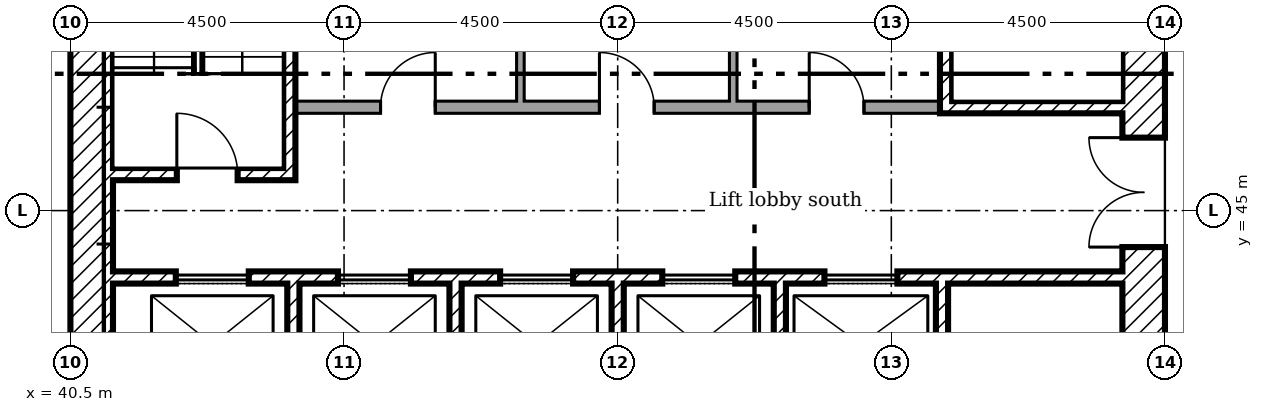
"""IFC4 building model, lengths in metres.
Left out: names, types, materials, properties, quantities, classifications, styles, units other than length and angle.
Written with IfcOpenShell. Run it as: python <this file> out.ifc"""

import sys

from ifc_helpers import new_model, si_unit, direction, frame, frame_2d, origin, place, context, subcontext, project, spatial, rectangle, extrude, element, fill, save


model = new_model("IFC4")
c1 = context("Model", 3, precision=1e-05, world=origin(), true_north=direction((0.0, 1.0)))
c2 = subcontext(c1, "Body", "Model", "MODEL_VIEW")
j1 = project(units=[si_unit("LENGTHUNIT", "METRE"), si_unit("PLANEANGLEUNIT", "RADIAN")], contexts=[c1])
p1 = place(None, origin())
s1 = spatial("IfcSite", under=j1, at=p1, CompositionType="ELEMENT")
p2 = place(p1, origin())
s2 = spatial("IfcBuilding", under=s1, at=p2, CompositionType="ELEMENT")
p3 = place(p2, frame((0.0, 0.0, 138.8)))
s3 = spatial("IfcBuildingStorey", under=s2, at=p3, CompositionType="ELEMENT", Elevation=138.8)
p4 = place(p3, frame((58.15, 40.5, 0.0), z_axis=(0.0, 0.0, 1.0), x_axis=(0.0, 1.0, 0.0)))
e1 = element("IfcWall", 1, at=p4, inside=s3, PredefinedType="SHEAR", context=c2, shape_type="SweptSolid", body=[
    extrude(rectangle(XDim=18.0, YDim=0.7, at=frame_2d((9.0, 0.0))), origin(), (0.0, 0.0, 1.0), 4.75),
])
p5 = place(p4, frame((13.15, 0.0, 0.0)))
e2 = element("IfcOpeningElement", 2, at=p5, cuts=e1, PredefinedType="OPENING", context=c2, shape_type="SweptSolid", body=[
    extrude(rectangle(XDim=1.2, YDim=2.1, at=frame_2d((0.6, 1.05))), frame((0.0, 0.36, 0.0), z_axis=(0.0, -1.0, 0.0), x_axis=(1.0, 0.0, 0.0)), (0.0, 0.0, 1.0), 0.72),
])
p6 = place(p4, frame((3.9, 0.0, 0.0)))
e3 = element("IfcOpeningElement", 3, at=p6, cuts=e1, PredefinedType="OPENING", context=c2, shape_type="SweptSolid", body=[
    extrude(rectangle(XDim=1.8, YDim=2.1, at=frame_2d((0.9, 1.05))), frame((0.0, 0.36, 0.0), z_axis=(0.0, -1.0, 0.0), x_axis=(1.0, 0.0, 0.0)), (0.0, 0.0, 1.0), 0.72),
])
p7 = place(p4, frame((11.525, 0.0, 0.0)))
e4 = element("IfcOpeningElement", 4, at=p7, cuts=e1, PredefinedType="OPENING", context=c2, shape_type="SweptSolid", body=[
    extrude(rectangle(XDim=1.0, YDim=2.1, at=frame_2d((0.5, 1.05))), frame((0.0, 0.36, 0.0), z_axis=(0.0, -1.0, 0.0), x_axis=(1.0, 0.0, 0.0)), (0.0, 0.0, 1.0), 0.72),
])
p8 = place(p3, frame((40.85, 40.5, 0.0), z_axis=(0.0, 0.0, 1.0), x_axis=(0.0, 1.0, 0.0)))
e5 = element("IfcWall", 5, at=p8, inside=s3, PredefinedType="SHEAR", context=c2, shape_type="SweptSolid", body=[
    extrude(rectangle(XDim=18.0, YDim=0.7, at=frame_2d((9.0, 0.0))), origin(), (0.0, 0.0, 1.0), 4.75),
])
for number, where, z_axis, x_axis in (
    (6, (44.167, 41.2, 0.0), (0.0, 0.0, 1.0), (0.0, 1.0, 0.0)),
    (7, (46.833, 41.2, 0.0), (0.0, 0.0, 1.0), (0.0, 1.0, 0.0)),
    (8, (49.5, 41.2, 0.0), (0.0, 0.0, 1.0), (0.0, 1.0, 0.0)),
    (9, (52.167, 41.2, 0.0), (0.0, 0.0, 1.0), (0.0, 1.0, 0.0)),
    (10, (54.833, 41.2, 0.0), (0.0, 0.0, 1.0), (0.0, 1.0, 0.0)),
):
    element("IfcWall", number, at=place(p3, frame(where, z_axis=z_axis, x_axis=x_axis)), inside=s3, PredefinedType="SHEAR", context=c2, shape_type="SweptSolid", body=[
        extrude(rectangle(XDim=2.6, YDim=0.2, at=frame_2d((1.3, 0.0))), origin(), (0.0, 0.0, 1.0), 4.75),
    ])
p9 = place(p3, frame((41.2, 43.9, 0.0)))
e11 = element("IfcWall", 11, at=p9, inside=s3, PredefinedType="SHEAR", context=c2, shape_type="SweptSolid", body=[
    extrude(rectangle(XDim=16.6, YDim=0.2, at=frame_2d((8.3, 0.0))), origin(), (0.0, 0.0, 1.0), 4.75),
])
p10 = place(p9, frame((1.033, 0.0, 0.0)))
e12 = element("IfcOpeningElement", 12, at=p10, cuts=e11, PredefinedType="OPENING", context=c2, shape_type="SweptSolid", body=[
    extrude(rectangle(XDim=1.2, YDim=2.1, at=frame_2d((0.6, 1.05))), frame((0.0, 0.11, 0.0), z_axis=(0.0, -1.0, 0.0), x_axis=(1.0, 0.0, 0.0)), (0.0, 0.0, 1.0), 0.22),
])
p11 = place(p9, frame((3.7, 0.0, 0.0)))
e13 = element("IfcOpeningElement", 13, at=p11, cuts=e11, PredefinedType="OPENING", context=c2, shape_type="SweptSolid", body=[
    extrude(rectangle(XDim=1.2, YDim=2.1, at=frame_2d((0.6, 1.05))), frame((0.0, 0.11, 0.0), z_axis=(0.0, -1.0, 0.0), x_axis=(1.0, 0.0, 0.0)), (0.0, 0.0, 1.0), 0.22),
])
p12 = place(p9, frame((6.367, 0.0, 0.0)))
e14 = element("IfcOpeningElement", 14, at=p12, cuts=e11, PredefinedType="OPENING", context=c2, shape_type="SweptSolid", body=[
    extrude(rectangle(XDim=1.2, YDim=2.1, at=frame_2d((0.6, 1.05))), frame((0.0, 0.11, 0.0), z_axis=(0.0, -1.0, 0.0), x_axis=(1.0, 0.0, 0.0)), (0.0, 0.0, 1.0), 0.22),
])
p13 = place(p9, frame((9.033, 0.0, 0.0)))
e15 = element("IfcOpeningElement", 15, at=p13, cuts=e11, PredefinedType="OPENING", context=c2, shape_type="SweptSolid", body=[
    extrude(rectangle(XDim=1.2, YDim=2.1, at=frame_2d((0.6, 1.05))), frame((0.0, 0.11, 0.0), z_axis=(0.0, -1.0, 0.0), x_axis=(1.0, 0.0, 0.0)), (0.0, 0.0, 1.0), 0.22),
])
p14 = place(p9, frame((11.7, 0.0, 0.0)))
e16 = element("IfcOpeningElement", 16, at=p14, cuts=e11, PredefinedType="OPENING", context=c2, shape_type="SweptSolid", body=[
    extrude(rectangle(XDim=1.2, YDim=2.1, at=frame_2d((0.6, 1.05))), frame((0.0, 0.11, 0.0), z_axis=(0.0, -1.0, 0.0), x_axis=(1.0, 0.0, 0.0)), (0.0, 0.0, 1.0), 0.22),
])
p15 = place(p3, frame((44.1, 45.5, 0.0), z_axis=(0.0, 0.0, 1.0), x_axis=(0.0, 1.0, 0.0)))
e17 = element("IfcWall", 17, at=p15, inside=s3, PredefinedType="SHEAR", context=c2, shape_type="SweptSolid", body=[
    extrude(rectangle(XDim=6.9, YDim=0.2, at=frame_2d((3.45, 0.0))), origin(), (0.0, 0.0, 1.0), 4.75),
])
p16 = place(p3, frame((41.2, 45.6, 0.0)))
e18 = element("IfcWall", 18, at=p16, inside=s3, PredefinedType="SHEAR", context=c2, shape_type="SweptSolid", body=[
    extrude(rectangle(XDim=2.8, YDim=0.2, at=frame_2d((1.4, 0.0))), origin(), (0.0, 0.0, 1.0), 4.75),
])
p17 = place(p16, frame((1.05, 0.0, 0.0)))
e19 = element("IfcOpeningElement", 19, at=p17, cuts=e18, PredefinedType="OPENING", context=c2, shape_type="SweptSolid", body=[
    extrude(rectangle(XDim=1.0, YDim=2.1, at=frame_2d((0.5, 1.05))), frame((0.0, 0.11, 0.0), z_axis=(0.0, -1.0, 0.0), x_axis=(1.0, 0.0, 0.0)), (0.0, 0.0, 1.0), 0.22),
])
p18 = place(p3, frame((54.8, 46.7, 0.0)))
e20 = element("IfcWall", 20, at=p18, inside=s3, PredefinedType="SHEAR", context=c2, shape_type="SweptSolid", body=[
    extrude(rectangle(XDim=3.0, YDim=0.2, at=frame_2d((1.5, 0.0))), origin(), (0.0, 0.0, 1.0), 4.75),
])
p19 = place(p3, frame((54.9, 46.8, 0.0), z_axis=(0.0, 0.0, 1.0), x_axis=(0.0, 1.0, 0.0)))
e21 = element("IfcWall", 21, at=p19, inside=s3, PredefinedType="SHEAR", context=c2, shape_type="SweptSolid", body=[
    extrude(rectangle(XDim=6.5, YDim=0.2, at=frame_2d((3.25, 0.0))), origin(), (0.0, 0.0, 1.0), 4.75),
])
p20 = place(p3, frame((44.2, 46.7, 0.0)))
e22 = element("IfcWall", 22, at=p20, inside=s3, PredefinedType="PARTITIONING", context=c2, shape_type="SweptSolid", body=[
    extrude(rectangle(XDim=10.6, YDim=0.2, at=frame_2d((5.3, 0.0))), origin(), (0.0, 0.0, 1.0), 4.75),
])
p21 = place(p20, frame((1.4, 0.0, 0.0)))
e23 = element("IfcOpeningElement", 23, at=p21, cuts=e22, PredefinedType="OPENING", context=c2, shape_type="SweptSolid", body=[
    extrude(rectangle(XDim=0.9, YDim=2.1, at=frame_2d((0.45, 1.05))), frame((0.0, 0.11, 0.0), z_axis=(0.0, -1.0, 0.0), x_axis=(1.0, 0.0, 0.0)), (0.0, 0.0, 1.0), 0.22),
])
p22 = place(p20, frame((5.0, 0.0, 0.0)))
e24 = element("IfcOpeningElement", 24, at=p22, cuts=e22, PredefinedType="OPENING", context=c2, shape_type="SweptSolid", body=[
    extrude(rectangle(XDim=0.9, YDim=2.1, at=frame_2d((0.45, 1.05))), frame((0.0, 0.11, 0.0), z_axis=(0.0, -1.0, 0.0), x_axis=(1.0, 0.0, 0.0)), (0.0, 0.0, 1.0), 0.22),
])
p23 = place(p20, frame((8.45, 0.0, 0.0)))
e25 = element("IfcOpeningElement", 25, at=p23, cuts=e22, PredefinedType="OPENING", context=c2, shape_type="SweptSolid", body=[
    extrude(rectangle(XDim=0.9, YDim=2.1, at=frame_2d((0.45, 1.05))), frame((0.0, 0.11, 0.0), z_axis=(0.0, -1.0, 0.0), x_axis=(1.0, 0.0, 0.0)), (0.0, 0.0, 1.0), 0.22),
])
p24 = place(p3, frame((47.9, 46.8, 0.0), z_axis=(0.0, 0.0, 1.0), x_axis=(0.0, 1.0, 0.0)))
e26 = element("IfcWall", 26, at=p24, inside=s3, PredefinedType="PARTITIONING", context=c2, shape_type="SweptSolid", body=[
    extrude(rectangle(XDim=5.0, YDim=0.125, at=frame_2d((2.5, 0.0))), origin(), (0.0, 0.0, 1.0), 4.75),
])
p25 = place(p3, frame((51.4, 46.8, 0.0), z_axis=(0.0, 0.0, 1.0), x_axis=(0.0, 1.0, 0.0)))
e27 = element("IfcWall", 27, at=p25, inside=s3, PredefinedType="PARTITIONING", context=c2, shape_type="SweptSolid", body=[
    extrude(rectangle(XDim=2.762, YDim=0.125, at=frame_2d((1.381, 0.0))), origin(), (0.0, 0.0, 1.0), 4.75),
])
p26 = place(p6, origin())
e28 = element("IfcDoor", 28, at=p26, inside=s3, OperationType="DOUBLE_DOOR_SINGLE_SWING", PredefinedType="DOOR", context=c2, shape_type="SweptSolid", body=[
    extrude(rectangle(XDim=1.8, YDim=2.1, at=frame_2d((0.9, 1.05))), frame((0.0, 0.025, 0.0), z_axis=(0.0, -1.0, 0.0), x_axis=(1.0, 0.0, 0.0)), (0.0, 0.0, 1.0), 0.05),
])
fill(e3, e28)
p27 = place(p17, origin())
e29 = element("IfcDoor", 29, at=p27, inside=s3, OperationType="SINGLE_SWING_RIGHT", PredefinedType="DOOR", context=c2, shape_type="SweptSolid", body=[
    extrude(rectangle(XDim=1.0, YDim=2.1, at=frame_2d((0.5, 1.05))), frame((0.0, 0.025, 0.0), z_axis=(0.0, -1.0, 0.0), x_axis=(1.0, 0.0, 0.0)), (0.0, 0.0, 1.0), 0.05),
])
fill(e19, e29)
p28 = place(p21, origin())
e30 = element("IfcDoor", 30, at=p28, inside=s3, OperationType="SINGLE_SWING_LEFT", PredefinedType="DOOR", context=c2, shape_type="SweptSolid", body=[
    extrude(rectangle(XDim=0.9, YDim=2.1, at=frame_2d((0.45, 1.05))), frame((0.0, 0.025, 0.0), z_axis=(0.0, -1.0, 0.0), x_axis=(1.0, 0.0, 0.0)), (0.0, 0.0, 1.0), 0.05),
])
fill(e23, e30)
p29 = place(p22, origin())
e31 = element("IfcDoor", 31, at=p29, inside=s3, OperationType="SINGLE_SWING_RIGHT", PredefinedType="DOOR", context=c2, shape_type="SweptSolid", body=[
    extrude(rectangle(XDim=0.9, YDim=2.1, at=frame_2d((0.45, 1.05))), frame((0.0, 0.025, 0.0), z_axis=(0.0, -1.0, 0.0), x_axis=(1.0, 0.0, 0.0)), (0.0, 0.0, 1.0), 0.05),
])
fill(e24, e31)
p30 = place(p23, origin())
e32 = element("IfcDoor", 32, at=p30, inside=s3, OperationType="SINGLE_SWING_RIGHT", PredefinedType="DOOR", context=c2, shape_type="SweptSolid", body=[
    extrude(rectangle(XDim=0.9, YDim=2.1, at=frame_2d((0.45, 1.05))), frame((0.0, 0.025, 0.0), z_axis=(0.0, -1.0, 0.0), x_axis=(1.0, 0.0, 0.0)), (0.0, 0.0, 1.0), 0.05),
])
fill(e25, e32)
p31 = place(p10, origin())
e33 = element("IfcDoor", 33, at=p31, inside=s3, OperationType="SLIDING_TO_LEFT", PredefinedType="DOOR", context=c2, shape_type="SweptSolid", body=[
    extrude(rectangle(XDim=1.2, YDim=2.1, at=frame_2d((0.6, 1.05))), frame((0.0, 0.025, 0.0), z_axis=(0.0, -1.0, 0.0), x_axis=(1.0, 0.0, 0.0)), (0.0, 0.0, 1.0), 0.05),
])
fill(e12, e33)
p32 = place(p11, origin())
e34 = element("IfcDoor", 34, at=p32, inside=s3, OperationType="SLIDING_TO_LEFT", PredefinedType="DOOR", context=c2, shape_type="SweptSolid", body=[
    extrude(rectangle(XDim=1.2, YDim=2.1, at=frame_2d((0.6, 1.05))), frame((0.0, 0.025, 0.0), z_axis=(0.0, -1.0, 0.0), x_axis=(1.0, 0.0, 0.0)), (0.0, 0.0, 1.0), 0.05),
])
fill(e13, e34)
p33 = place(p12, origin())
e35 = element("IfcDoor", 35, at=p33, inside=s3, OperationType="SLIDING_TO_LEFT", PredefinedType="DOOR", context=c2, shape_type="SweptSolid", body=[
    extrude(rectangle(XDim=1.2, YDim=2.1, at=frame_2d((0.6, 1.05))), frame((0.0, 0.025, 0.0), z_axis=(0.0, -1.0, 0.0), x_axis=(1.0, 0.0, 0.0)), (0.0, 0.0, 1.0), 0.05),
])
fill(e14, e35)
p34 = place(p13, origin())
e36 = element("IfcDoor", 36, at=p34, inside=s3, OperationType="SLIDING_TO_LEFT", PredefinedType="DOOR", context=c2, shape_type="SweptSolid", body=[
    extrude(rectangle(XDim=1.2, YDim=2.1, at=frame_2d((0.6, 1.05))), frame((0.0, 0.025, 0.0), z_axis=(0.0, -1.0, 0.0), x_axis=(1.0, 0.0, 0.0)), (0.0, 0.0, 1.0), 0.05),
])
fill(e15, e36)
p35 = place(p14, origin())
e37 = element("IfcDoor", 37, at=p35, inside=s3, OperationType="SLIDING_TO_LEFT", PredefinedType="DOOR", context=c2, shape_type="SweptSolid", body=[
    extrude(rectangle(XDim=1.2, YDim=2.1, at=frame_2d((0.6, 1.05))), frame((0.0, 0.025, 0.0), z_axis=(0.0, -1.0, 0.0), x_axis=(1.0, 0.0, 0.0)), (0.0, 0.0, 1.0), 0.05),
])
fill(e16, e37)
save(model, sys.argv[1])
